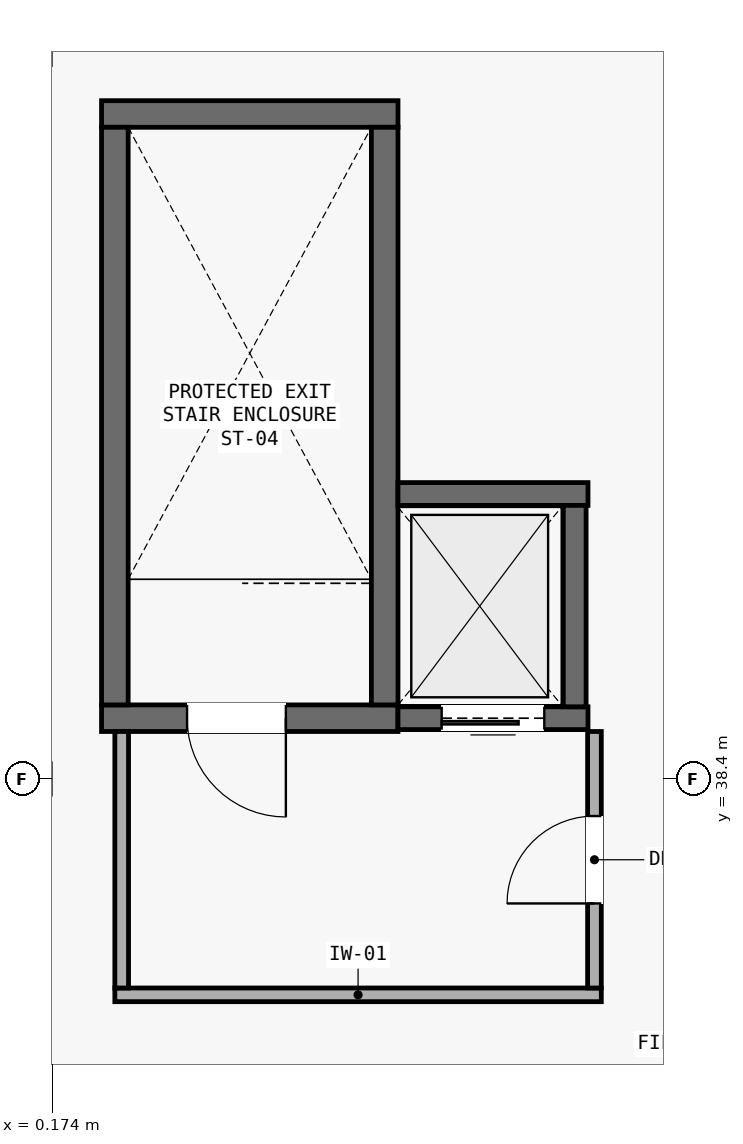
"""IFC4 building model, lengths in metres.
Left out: names, types, materials, properties, quantities, classifications, styles, units other than length and angle.
Written with IfcOpenShell. Run it as: python <this file> out.ifc"""

import sys

from ifc_helpers import new_model, si_unit, direction, frame, frame_2d, origin, place, context, subcontext, project, spatial, rectangle, extrude, element, fill, save


model = new_model("IFC4")
c1 = context("Model", 3, precision=1e-05, world=origin(), true_north=direction((0.0, 1.0)))
c2 = subcontext(c1, "Body", "Model", "MODEL_VIEW")
j1 = project(units=[si_unit("LENGTHUNIT", "METRE"), si_unit("PLANEANGLEUNIT", "RADIAN")], contexts=[c1])
p1 = place(None, origin())
s1 = spatial("IfcSite", under=j1, at=p1, CompositionType="ELEMENT")
p2 = place(p1, origin())
s2 = spatial("IfcBuilding", under=s1, at=p2, CompositionType="ELEMENT")
p3 = place(p2, frame((0.0, 0.0, 22.05)))
s3 = spatial("IfcBuildingStorey", under=s2, at=p3, CompositionType="ELEMENT", Elevation=22.05)
p4 = place(p3, frame((0.825, 39.2, 0.0), z_axis=(0.0, 0.0, 1.0), x_axis=(1.0, 0.0, 0.0)))
e1 = element("IfcWall", 1, at=p4, inside=s3, PredefinedType="SHEAR", context=c2, shape_type="SweptSolid", body=[
    extrude(rectangle(XDim=3.9, YDim=0.35, at=frame_2d((1.95, 0.0))), origin(), (0.0, 0.0, 1.0), 4.0),
])
p5 = place(p4, frame((1.125, 0.0, 0.0)))
e2 = element("IfcOpeningElement", 2, at=p5, cuts=e1, PredefinedType="OPENING", context=c2, shape_type="SweptSolid", body=[
    extrude(rectangle(XDim=1.3, YDim=2.15, at=frame_2d((0.65, 1.075))), frame((0.0, 0.185, 0.0), z_axis=(0.0, -1.0, 0.0), x_axis=(1.0, 0.0, 0.0)), (0.0, 0.0, 1.0), 0.37),
])
p6 = place(p3, frame((0.825, 47.15, 0.0), z_axis=(0.0, 0.0, 1.0), x_axis=(1.0, 0.0, 0.0)))
e3 = element("IfcWall", 3, at=p6, inside=s3, PredefinedType="SHEAR", context=c2, shape_type="SweptSolid", body=[
    extrude(rectangle(XDim=3.9, YDim=0.35, at=frame_2d((1.95, 0.0))), origin(), (0.0, 0.0, 1.0), 4.0),
])
for number, where, z_axis, x_axis in (
    (4, (1.0, 39.375, 0.0), (0.0, 0.0, 1.0), (0.0, 1.0, 0.0)),
    (5, (4.55, 39.375, 0.0), (0.0, 0.0, 1.0), (0.0, 1.0, 0.0)),
):
    element("IfcWall", number, at=place(p3, frame(where, z_axis=z_axis, x_axis=x_axis)), inside=s3, PredefinedType="SHEAR", context=c2, shape_type="SweptSolid", body=[
        extrude(rectangle(XDim=7.6, YDim=0.35, at=frame_2d((3.8, 0.0))), origin(), (0.0, 0.0, 1.0), 4.0),
    ])
p7 = place(p3, frame((4.725, 39.2, 0.0), z_axis=(0.0, 0.0, 1.0), x_axis=(1.0, 0.0, 0.0)))
e6 = element("IfcWall", 6, at=p7, inside=s3, PredefinedType="SHEAR", context=c2, shape_type="SweptSolid", body=[
    extrude(rectangle(XDim=2.5, YDim=0.3, at=frame_2d((1.25, 0.0))), origin(), (0.0, 0.0, 1.0), 4.0),
])
p8 = place(p7, frame((0.575, 0.0, 0.0)))
e7 = element("IfcOpeningElement", 7, at=p8, cuts=e6, PredefinedType="OPENING", context=c2, shape_type="SweptSolid", body=[
    extrude(rectangle(XDim=1.35, YDim=2.15, at=frame_2d((0.675, 1.075))), frame((0.0, 0.16, 0.0), z_axis=(0.0, -1.0, 0.0), x_axis=(1.0, 0.0, 0.0)), (0.0, 0.0, 1.0), 0.32),
])
p9 = place(p3, frame((4.725, 42.15, 0.0), z_axis=(0.0, 0.0, 1.0), x_axis=(1.0, 0.0, 0.0)))
e8 = element("IfcWall", 8, at=p9, inside=s3, PredefinedType="SHEAR", context=c2, shape_type="SweptSolid", body=[
    extrude(rectangle(XDim=2.5, YDim=0.3, at=frame_2d((1.25, 0.0))), origin(), (0.0, 0.0, 1.0), 4.0),
])
p10 = place(p3, frame((7.05, 39.35, 0.0), z_axis=(0.0, 0.0, 1.0), x_axis=(0.0, 1.0, 0.0)))
e9 = element("IfcWall", 9, at=p10, inside=s3, PredefinedType="SHEAR", context=c2, shape_type="SweptSolid", body=[
    extrude(rectangle(XDim=2.65, YDim=0.3, at=frame_2d((1.325, 0.0))), origin(), (0.0, 0.0, 1.0), 4.0),
])
p11 = place(p3, frame((1.0, 35.56, 0.0), z_axis=(0.0, 0.0, 1.0), x_axis=(1.0, 0.0, 0.0)))
e10 = element("IfcWall", 10, at=p11, inside=s3, PredefinedType="PARTITIONING", context=c2, shape_type="SweptSolid", body=[
    extrude(rectangle(XDim=6.4, YDim=0.18, at=frame_2d((3.2, 0.0))), origin(), (0.0, 0.0, 1.0), 4.0),
])
p12 = place(p3, frame((1.09, 35.65, 0.0), z_axis=(0.0, 0.0, 1.0), x_axis=(0.0, 1.0, 0.0)))
e11 = element("IfcWall", 11, at=p12, inside=s3, PredefinedType="PARTITIONING", context=c2, shape_type="SweptSolid", body=[
    extrude(rectangle(XDim=3.375, YDim=0.18, at=frame_2d((1.688, 0.0))), origin(), (0.0, 0.0, 1.0), 4.0),
])
p13 = place(p3, frame((7.31, 35.65, 0.0), z_axis=(0.0, 0.0, 1.0), x_axis=(0.0, 1.0, 0.0)))
e12 = element("IfcWall", 12, at=p13, inside=s3, PredefinedType="PARTITIONING", context=c2, shape_type="SweptSolid", body=[
    extrude(rectangle(XDim=3.375, YDim=0.18, at=frame_2d((1.688, 0.0))), origin(), (0.0, 0.0, 1.0), 4.0),
])
p14 = place(p13, frame((1.113, 0.0, 0.0)))
e13 = element("IfcOpeningElement", 13, at=p14, cuts=e12, PredefinedType="OPENING", context=c2, shape_type="SweptSolid", body=[
    extrude(rectangle(XDim=1.15, YDim=2.15, at=frame_2d((0.575, 1.075))), frame((0.0, 0.1, 0.0), z_axis=(0.0, -1.0, 0.0), x_axis=(1.0, 0.0, 0.0)), (0.0, 0.0, 1.0), 0.2),
])
p15 = place(p5, frame((1.3, 0.0, 0.0), z_axis=(0.0, 0.0, 1.0), x_axis=(-1.0, 0.0, 0.0)))
e14 = element("IfcDoor", 14, at=p15, inside=s3, OperationType="SINGLE_SWING_RIGHT", PredefinedType="DOOR", context=c2, shape_type="SweptSolid", body=[
    extrude(rectangle(XDim=1.3, YDim=2.15, at=frame_2d((0.65, 1.075))), frame((0.0, 0.025, 0.0), z_axis=(0.0, -1.0, 0.0), x_axis=(1.0, 0.0, 0.0)), (0.0, 0.0, 1.0), 0.05),
])
fill(e2, e14)
p16 = place(p8, frame((1.35, 0.0, 0.0), z_axis=(0.0, 0.0, 1.0), x_axis=(-1.0, 0.0, 0.0)))
e15 = element("IfcDoor", 15, at=p16, inside=s3, OperationType="SLIDING_TO_RIGHT", PredefinedType="DOOR", context=c2, shape_type="SweptSolid", body=[
    extrude(rectangle(XDim=1.35, YDim=2.15, at=frame_2d((0.675, 1.075))), frame((0.0, 0.025, 0.0), z_axis=(0.0, -1.0, 0.0), x_axis=(1.0, 0.0, 0.0)), (0.0, 0.0, 1.0), 0.05),
])
fill(e7, e15)
p17 = place(p14, origin())
e16 = element("IfcDoor", 16, at=p17, inside=s3, OperationType="SINGLE_SWING_LEFT", PredefinedType="DOOR", context=c2, shape_type="SweptSolid", body=[
    extrude(rectangle(XDim=1.15, YDim=2.15, at=frame_2d((0.575, 1.075))), frame((0.0, 0.025, 0.0), z_axis=(0.0, -1.0, 0.0), x_axis=(1.0, 0.0, 0.0)), (0.0, 0.0, 1.0), 0.05),
])
fill(e13, e16)
save(model, sys.argv[1])
